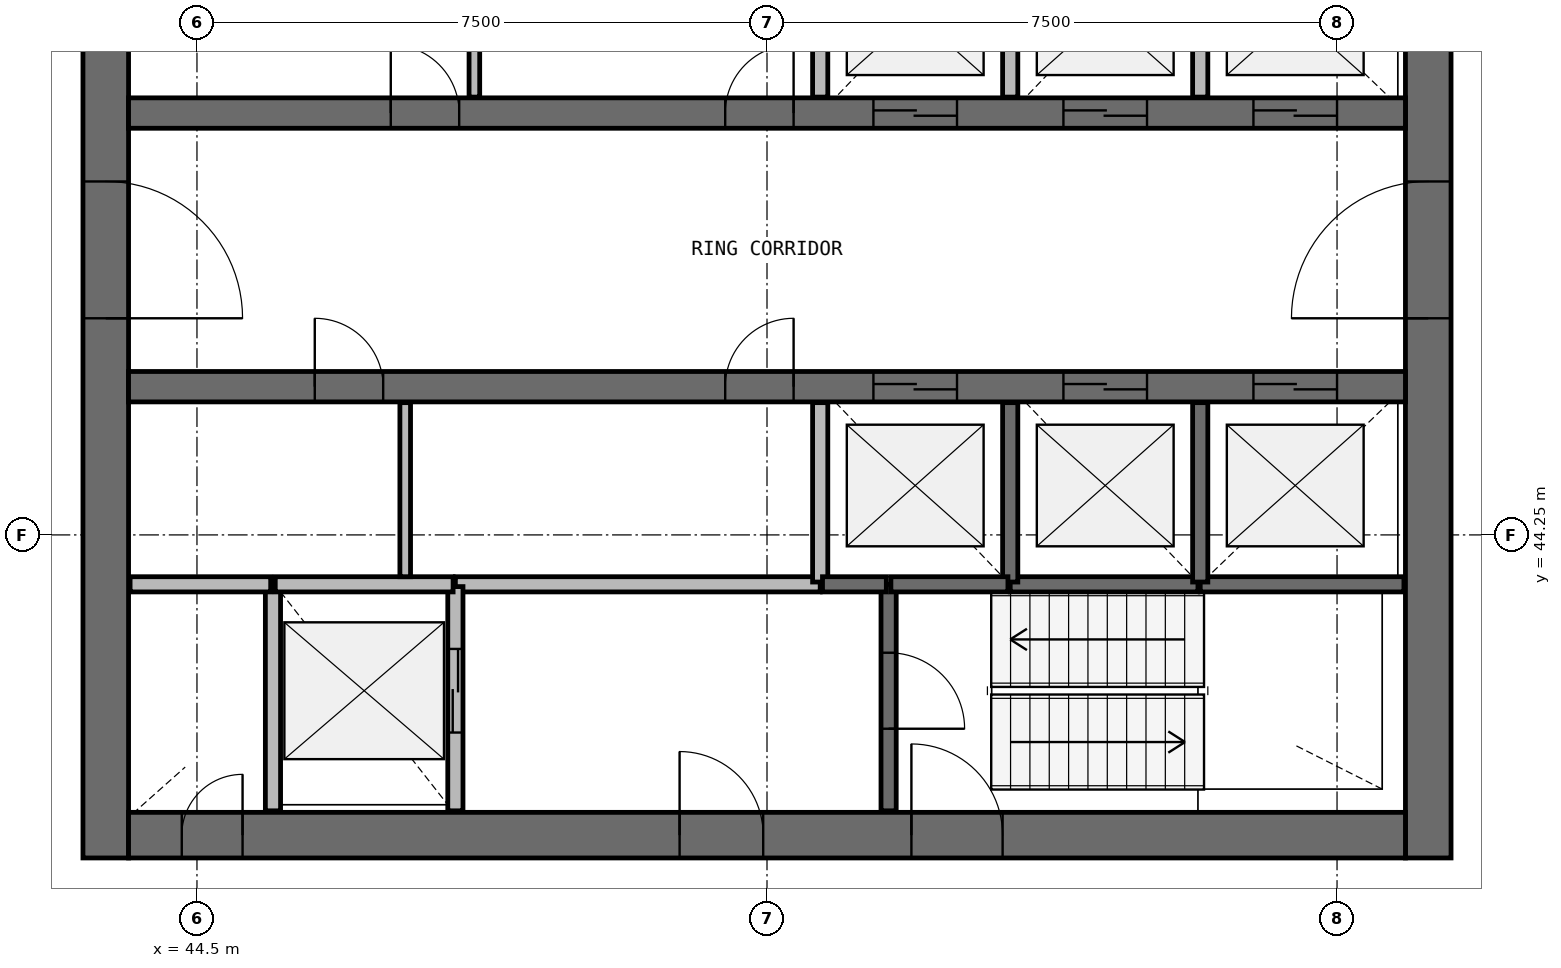
"""IFC4 building model, lengths in metres.
Left out: names, types, materials, properties, quantities, classifications, styles, units other than length and angle.
Written with IfcOpenShell. Run it as: python <this file> out.ifc"""

import sys

from ifc_helpers import new_model, si_unit, direction, frame, frame_2d, origin, place, context, subcontext, project, spatial, rectangle, extrude, source, transform, mapped, element, fill, save


model = new_model("IFC4")
c1 = context("Model", 3, precision=1e-05, world=origin(), true_north=direction((0.0, 1.0)))
c2 = subcontext(c1, "Body", "Model", "MODEL_VIEW")
j1 = project(units=[si_unit("LENGTHUNIT", "METRE"), si_unit("PLANEANGLEUNIT", "RADIAN")], contexts=[c1])
p1 = place(None, origin())
s1 = spatial("IfcSite", under=j1, at=p1, CompositionType="ELEMENT")
p2 = place(p1, origin())
s2 = spatial("IfcBuilding", under=s1, at=p2, CompositionType="ELEMENT")
p3 = place(p2, frame((0.0, 0.0, 226.7)))
s3 = spatial("IfcBuildingStorey", under=s2, at=p3, CompositionType="ELEMENT", Elevation=226.7)
p4 = place(p3, frame((60.7, 40.0, 0.0), z_axis=(0.0, 0.0, 1.0), x_axis=(0.0, 1.0, 0.0)))
e1 = element("IfcWall", 1, at=p4, inside=s3, PredefinedType="SHEAR", context=c2, shape_type="SweptSolid", body=[
    extrude(rectangle(XDim=16.0, YDim=0.6, at=frame_2d((8.0, 0.0))), origin(), (0.0, 0.0, 1.0), 3.9),
])
p5 = place(p4, frame((7.1, 0.0, 0.0)))
e2 = element("IfcOpeningElement", 2, at=p5, cuts=e1, PredefinedType="OPENING", context=c2, shape_type="SweptSolid", body=[
    extrude(rectangle(XDim=1.8, YDim=2.1, at=frame_2d((0.9, 1.05))), frame((0.0, 0.31, 0.0), z_axis=(0.0, -1.0, 0.0), x_axis=(1.0, 0.0, 0.0)), (0.0, 0.0, 1.0), 0.62),
])
p6 = place(p3, frame((43.3, 56.0, 0.0), z_axis=(0.0, 0.0, 1.0), x_axis=(0.0, -1.0, 0.0)))
e3 = element("IfcWall", 3, at=p6, inside=s3, PredefinedType="SHEAR", context=c2, shape_type="SweptSolid", body=[
    extrude(rectangle(XDim=16.0, YDim=0.6, at=frame_2d((8.0, 0.0))), origin(), (0.0, 0.0, 1.0), 3.9),
])
p7 = place(p6, frame((7.1, 0.0, 0.0)))
e4 = element("IfcOpeningElement", 4, at=p7, cuts=e3, PredefinedType="OPENING", context=c2, shape_type="SweptSolid", body=[
    extrude(rectangle(XDim=1.8, YDim=2.1, at=frame_2d((0.9, 1.05))), frame((0.0, 0.31, 0.0), z_axis=(0.0, -1.0, 0.0), x_axis=(1.0, 0.0, 0.0)), (0.0, 0.0, 1.0), 0.62),
])
p8 = place(p3, frame((43.6, 40.3, 0.0), z_axis=(0.0, 0.0, 1.0), x_axis=(1.0, 0.0, 0.0)))
e5 = element("IfcWall", 5, at=p8, inside=s3, PredefinedType="SHEAR", context=c2, shape_type="SweptSolid", body=[
    extrude(rectangle(XDim=16.8, YDim=0.6, at=frame_2d((8.4, 0.0))), origin(), (0.0, 0.0, 1.0), 3.9),
])
p9 = place(p8, frame((10.3, 0.0, 0.0)))
e6 = element("IfcOpeningElement", 6, at=p9, cuts=e5, PredefinedType="OPENING", context=c2, shape_type="SweptSolid", body=[
    extrude(rectangle(XDim=1.2, YDim=2.1, at=frame_2d((0.6, 1.05))), frame((0.0, 0.31, 0.0), z_axis=(0.0, -1.0, 0.0), x_axis=(1.0, 0.0, 0.0)), (0.0, 0.0, 1.0), 0.62),
])
p10 = place(p8, frame((7.25, 0.0, 0.0)))
e7 = element("IfcOpeningElement", 7, at=p10, cuts=e5, PredefinedType="OPENING", context=c2, shape_type="SweptSolid", body=[
    extrude(rectangle(XDim=1.1, YDim=2.1, at=frame_2d((0.55, 1.05))), frame((0.0, 0.31, 0.0), z_axis=(0.0, -1.0, 0.0), x_axis=(1.0, 0.0, 0.0)), (0.0, 0.0, 1.0), 0.62),
])
p11 = place(p8, frame((0.7, 0.0, 0.0)))
e8 = element("IfcOpeningElement", 8, at=p11, cuts=e5, PredefinedType="OPENING", context=c2, shape_type="SweptSolid", body=[
    extrude(rectangle(XDim=0.8, YDim=2.1, at=frame_2d((0.4, 1.05))), frame((0.0, 0.31, 0.0), z_axis=(0.0, -1.0, 0.0), x_axis=(1.0, 0.0, 0.0)), (0.0, 0.0, 1.0), 0.62),
])
p12 = place(p3, frame((43.6, 49.8, 0.0), z_axis=(0.0, 0.0, 1.0), x_axis=(1.0, 0.0, 0.0)))
e9 = element("IfcWall", 9, at=p12, inside=s3, PredefinedType="SHEAR", context=c2, shape_type="SweptSolid", body=[
    extrude(rectangle(XDim=16.8, YDim=0.4, at=frame_2d((8.4, 0.0))), origin(), (0.0, 0.0, 1.0), 3.9),
])
p13 = place(p12, frame((9.8, 0.0, 0.0)))
e10 = element("IfcOpeningElement", 10, at=p13, cuts=e9, PredefinedType="OPENING", context=c2, shape_type="SweptSolid", body=[
    extrude(rectangle(XDim=1.1, YDim=2.1, at=frame_2d((0.55, 1.05))), frame((0.0, 0.21, 0.0), z_axis=(0.0, -1.0, 0.0), x_axis=(1.0, 0.0, 0.0)), (0.0, 0.0, 1.0), 0.42),
])
p14 = place(p12, frame((12.3, 0.0, 0.0)))
e11 = element("IfcOpeningElement", 11, at=p14, cuts=e9, PredefinedType="OPENING", context=c2, shape_type="SweptSolid", body=[
    extrude(rectangle(XDim=1.1, YDim=2.1, at=frame_2d((0.55, 1.05))), frame((0.0, 0.21, 0.0), z_axis=(0.0, -1.0, 0.0), x_axis=(1.0, 0.0, 0.0)), (0.0, 0.0, 1.0), 0.42),
])
p15 = place(p12, frame((14.8, 0.0, 0.0)))
e12 = element("IfcOpeningElement", 12, at=p15, cuts=e9, PredefinedType="OPENING", context=c2, shape_type="SweptSolid", body=[
    extrude(rectangle(XDim=1.1, YDim=2.1, at=frame_2d((0.55, 1.05))), frame((0.0, 0.21, 0.0), z_axis=(0.0, -1.0, 0.0), x_axis=(1.0, 0.0, 0.0)), (0.0, 0.0, 1.0), 0.42),
])
p16 = place(p12, frame((3.45, 0.0, 0.0)))
e13 = element("IfcOpeningElement", 13, at=p16, cuts=e9, PredefinedType="OPENING", context=c2, shape_type="SweptSolid", body=[
    extrude(rectangle(XDim=0.9, YDim=2.1, at=frame_2d((0.45, 1.05))), frame((0.0, 0.21, 0.0), z_axis=(0.0, -1.0, 0.0), x_axis=(1.0, 0.0, 0.0)), (0.0, 0.0, 1.0), 0.42),
])
p17 = place(p12, frame((7.85, 0.0, 0.0)))
e14 = element("IfcOpeningElement", 14, at=p17, cuts=e9, PredefinedType="OPENING", context=c2, shape_type="SweptSolid", body=[
    extrude(rectangle(XDim=0.9, YDim=2.1, at=frame_2d((0.45, 1.05))), frame((0.0, 0.21, 0.0), z_axis=(0.0, -1.0, 0.0), x_axis=(1.0, 0.0, 0.0)), (0.0, 0.0, 1.0), 0.42),
])
p18 = place(p3, frame((43.6, 46.2, 0.0), z_axis=(0.0, 0.0, 1.0), x_axis=(1.0, 0.0, 0.0)))
e15 = element("IfcWall", 15, at=p18, inside=s3, PredefinedType="SHEAR", context=c2, shape_type="SweptSolid", body=[
    extrude(rectangle(XDim=16.8, YDim=0.4, at=frame_2d((8.4, 0.0))), origin(), (0.0, 0.0, 1.0), 3.9),
])
p19 = place(p18, frame((9.8, 0.0, 0.0)))
e16 = element("IfcOpeningElement", 16, at=p19, cuts=e15, PredefinedType="OPENING", context=c2, shape_type="SweptSolid", body=[
    extrude(rectangle(XDim=1.1, YDim=2.1, at=frame_2d((0.55, 1.05))), frame((0.0, 0.21, 0.0), z_axis=(0.0, -1.0, 0.0), x_axis=(1.0, 0.0, 0.0)), (0.0, 0.0, 1.0), 0.42),
])
p20 = place(p18, frame((12.3, 0.0, 0.0)))
e17 = element("IfcOpeningElement", 17, at=p20, cuts=e15, PredefinedType="OPENING", context=c2, shape_type="SweptSolid", body=[
    extrude(rectangle(XDim=1.1, YDim=2.1, at=frame_2d((0.55, 1.05))), frame((0.0, 0.21, 0.0), z_axis=(0.0, -1.0, 0.0), x_axis=(1.0, 0.0, 0.0)), (0.0, 0.0, 1.0), 0.42),
])
p21 = place(p18, frame((14.8, 0.0, 0.0)))
e18 = element("IfcOpeningElement", 18, at=p21, cuts=e15, PredefinedType="OPENING", context=c2, shape_type="SweptSolid", body=[
    extrude(rectangle(XDim=1.1, YDim=2.1, at=frame_2d((0.55, 1.05))), frame((0.0, 0.21, 0.0), z_axis=(0.0, -1.0, 0.0), x_axis=(1.0, 0.0, 0.0)), (0.0, 0.0, 1.0), 0.42),
])
p22 = place(p18, frame((2.45, 0.0, 0.0)))
e19 = element("IfcOpeningElement", 19, at=p22, cuts=e15, PredefinedType="OPENING", context=c2, shape_type="SweptSolid", body=[
    extrude(rectangle(XDim=0.9, YDim=2.1, at=frame_2d((0.45, 1.05))), frame((0.0, 0.21, 0.0), z_axis=(0.0, -1.0, 0.0), x_axis=(1.0, 0.0, 0.0)), (0.0, 0.0, 1.0), 0.42),
])
p23 = place(p18, frame((7.85, 0.0, 0.0)))
e20 = element("IfcOpeningElement", 20, at=p23, cuts=e15, PredefinedType="OPENING", context=c2, shape_type="SweptSolid", body=[
    extrude(rectangle(XDim=0.9, YDim=2.1, at=frame_2d((0.45, 1.05))), frame((0.0, 0.21, 0.0), z_axis=(0.0, -1.0, 0.0), x_axis=(1.0, 0.0, 0.0)), (0.0, 0.0, 1.0), 0.42),
])
p24 = place(p3, frame((52.7, 43.6, 0.0), z_axis=(0.0, 0.0, 1.0), x_axis=(-1.0, 0.0, 0.0)))
e21 = element("IfcWall", 21, at=p24, inside=s3, PredefinedType="SOLIDWALL", context=c2, shape_type="SweptSolid", body=[
    extrude(rectangle(XDim=4.8, YDim=0.2, at=frame_2d((2.4, 0.0))), origin(), (0.0, 0.0, 1.0), 3.4),
])
p25 = place(p3, frame((45.5, 43.6, 0.0), z_axis=(0.0, 0.0, 1.0), x_axis=(0.0, -1.0, 0.0)))
e22 = element("IfcWall", 22, at=p25, inside=s3, PredefinedType="SOLIDWALL", context=c2, shape_type="SweptSolid", body=[
    extrude(rectangle(XDim=2.98, YDim=0.2, at=frame_2d((1.49, 0.0))), origin(), (0.0, 0.0, 1.0), 3.4),
])
p26 = place(p3, frame((47.9, 40.62, 0.0), z_axis=(0.0, 0.0, 1.0), x_axis=(0.0, 1.0, 0.0)))
e23 = element("IfcWall", 23, at=p26, inside=s3, PredefinedType="SOLIDWALL", context=c2, shape_type="SweptSolid", body=[
    extrude(rectangle(XDim=2.95, YDim=0.2, at=frame_2d((1.475, 0.0))), origin(), (0.0, 0.0, 1.0), 3.4),
])
p27 = place(p26, frame((1.03, 0.0, 0.0)))
e24 = element("IfcOpeningElement", 24, at=p27, cuts=e23, PredefinedType="OPENING", context=c2, shape_type="SweptSolid", body=[
    extrude(rectangle(XDim=1.1, YDim=2.1, at=frame_2d((0.55, 1.05))), frame((0.0, 0.11, 0.0), z_axis=(0.0, -1.0, 0.0), x_axis=(1.0, 0.0, 0.0)), (0.0, 0.0, 1.0), 0.22),
])
p28 = place(p3, frame((53.6, 43.6, 0.0), z_axis=(0.0, 0.0, 1.0), x_axis=(0.0, -1.0, 0.0)))
e25 = element("IfcWall", 25, at=p28, inside=s3, PredefinedType="SOLIDWALL", context=c2, shape_type="SweptSolid", body=[
    extrude(rectangle(XDim=2.98, YDim=0.2, at=frame_2d((1.49, 0.0))), origin(), (0.0, 0.0, 1.0), 3.4),
])
p29 = place(p28, frame((0.9, 0.0, 0.0)))
e26 = element("IfcOpeningElement", 26, at=p29, cuts=e25, PredefinedType="OPENING", context=c2, shape_type="SweptSolid", body=[
    extrude(rectangle(XDim=1.0, YDim=2.1, at=frame_2d((0.5, 1.05))), frame((0.0, 0.11, 0.0), z_axis=(0.0, -1.0, 0.0), x_axis=(1.0, 0.0, 0.0)), (0.0, 0.0, 1.0), 0.22),
])
p30 = place(p3, frame((57.7, 43.6, 0.0), z_axis=(0.0, 0.0, 1.0), x_axis=(1.0, 0.0, 0.0)))
e27 = element("IfcWall", 27, at=p30, inside=s3, PredefinedType="SOLIDWALL", context=c2, shape_type="SweptSolid", body=[
    extrude(rectangle(XDim=2.68, YDim=0.2, at=frame_2d((1.34, 0.0))), origin(), (0.0, 0.0, 1.0), 3.4),
])
p31 = place(p3, frame((55.2, 43.6, 0.0), z_axis=(0.0, 0.0, 1.0), x_axis=(1.0, 0.0, 0.0)))
e28 = element("IfcWall", 28, at=p31, inside=s3, PredefinedType="SOLIDWALL", context=c2, shape_type="SweptSolid", body=[
    extrude(rectangle(XDim=2.47, YDim=0.2, at=frame_2d((1.235, 0.0))), origin(), (0.0, 0.0, 1.0), 3.4),
])
p32 = place(p3, frame((47.87, 43.6, 0.0), z_axis=(0.0, 0.0, 1.0), x_axis=(-1.0, 0.0, 0.0)))
e29 = element("IfcWall", 29, at=p32, inside=s3, PredefinedType="SOLIDWALL", context=c2, shape_type="SweptSolid", body=[
    extrude(rectangle(XDim=2.34, YDim=0.2, at=frame_2d((1.17, 0.0))), origin(), (0.0, 0.0, 1.0), 3.4),
])
for number, where, z_axis, x_axis in (
    (30, (52.7, 45.99, 0.0), (0.0, 0.0, 1.0), (0.0, -1.0, 0.0)),
    (31, (52.7, 52.37, 0.0), (0.0, 0.0, 1.0), (0.0, -1.0, 0.0)),
    (32, (55.2, 43.63, 0.0), (0.0, 0.0, 1.0), (0.0, 1.0, 0.0)),
    (33, (55.2, 50.01, 0.0), (0.0, 0.0, 1.0), (0.0, 1.0, 0.0)),
    (34, (57.7, 43.63, 0.0), (0.0, 0.0, 1.0), (0.0, 1.0, 0.0)),
):
    element("IfcWall", number, at=place(p3, frame(where, z_axis=z_axis, x_axis=x_axis)), inside=s3, PredefinedType="SOLIDWALL", context=c2, shape_type="SweptSolid", body=[
        extrude(rectangle(XDim=2.36, YDim=0.2, at=frame_2d((1.18, 0.0))), origin(), (0.0, 0.0, 1.0), 3.4),
    ])
p33 = place(p3, frame((57.7, 50.01, 0.0), z_axis=(0.0, 0.0, 1.0), x_axis=(0.0, 1.0, 0.0)))
e35 = element("IfcWall", 35, at=p33, inside=s3, PredefinedType="SOLIDWALL", context=c2, shape_type="SweptSolid", body=[
    extrude(rectangle(XDim=2.39, YDim=0.2, at=frame_2d((1.195, 0.0))), origin(), (0.0, 0.0, 1.0), 3.4),
])
p34 = place(p3, frame((45.47, 43.6, 0.0), z_axis=(0.0, 0.0, 1.0), x_axis=(-1.0, 0.0, 0.0)))
e36 = element("IfcWall", 36, at=p34, inside=s3, PredefinedType="SOLIDWALL", context=c2, shape_type="SweptSolid", body=[
    extrude(rectangle(XDim=1.85, YDim=0.2, at=frame_2d((0.925, 0.0))), origin(), (0.0, 0.0, 1.0), 3.4),
])
p35 = place(p3, frame((53.63, 43.6, 0.0), z_axis=(0.0, 0.0, 1.0), x_axis=(1.0, 0.0, 0.0)))
e37 = element("IfcWall", 37, at=p35, inside=s3, PredefinedType="SOLIDWALL", context=c2, shape_type="SweptSolid", body=[
    extrude(rectangle(XDim=1.54, YDim=0.2, at=frame_2d((0.77, 0.0))), origin(), (0.0, 0.0, 1.0), 3.4),
])
p36 = place(p3, frame((52.73, 43.6, 0.0), z_axis=(0.0, 0.0, 1.0), x_axis=(1.0, 0.0, 0.0)))
e38 = element("IfcWall", 38, at=p36, inside=s3, PredefinedType="SOLIDWALL", context=c2, shape_type="SweptSolid", body=[
    extrude(rectangle(XDim=0.84, YDim=0.2, at=frame_2d((0.42, 0.0))), origin(), (0.0, 0.0, 1.0), 3.4),
])
for number, where, z_axis, x_axis in (
    (39, (47.24, 43.7, 0.0), (0.0, 0.0, 1.0), (0.0, 1.0, 0.0)),
    (40, (48.15, 50.01, 0.0), (0.0, 0.0, 1.0), (0.0, 1.0, 0.0)),
):
    element("IfcWall", number, at=place(p3, frame(where, z_axis=z_axis, x_axis=x_axis)), inside=s3, PredefinedType="PARTITIONING", context=c2, shape_type="SweptSolid", body=[
        extrude(rectangle(XDim=2.29, YDim=0.14, at=frame_2d((1.145, 0.0))), origin(), (0.0, 0.0, 1.0), 2.7),
    ])
m1 = source(origin(), c2, "Body", "SweptSolid", [
    extrude(rectangle(XDim=1.8, YDim=2.1, at=frame_2d((0.9, 1.05))), frame((0.0, 0.025, 0.0), z_axis=(0.0, -1.0, 0.0), x_axis=(1.0, 0.0, 0.0)), (0.0, 0.0, 1.0), 0.05),
])
p37 = place(p7, origin())
e41 = element("IfcDoor", 41, at=p37, inside=s3, OperationType="SINGLE_SWING_RIGHT", PredefinedType="DOOR", context=c2, shape_type="MappedRepresentation", body=[
    mapped(m1, transform((0.0, 0.0, 0.0), scale=1.0)),
])
fill(e4, e41)
p38 = place(p5, origin())
e42 = element("IfcDoor", 42, at=p38, inside=s3, OperationType="SINGLE_SWING_LEFT", PredefinedType="DOOR", context=c2, shape_type="MappedRepresentation", body=[
    mapped(m1, transform((0.0, 0.0, 0.0), scale=1.0)),
])
fill(e2, e42)
m2 = source(origin(), c2, "Body", "SweptSolid", [
    extrude(rectangle(XDim=1.1, YDim=2.1, at=frame_2d((0.55, 1.05))), frame((0.0, 0.025, 0.0), z_axis=(0.0, -1.0, 0.0), x_axis=(1.0, 0.0, 0.0)), (0.0, 0.0, 1.0), 0.05),
])
p39 = place(p13, origin())
e43 = element("IfcDoor", 43, at=p39, inside=s3, OperationType="DOUBLE_DOOR_SLIDING", PredefinedType="USERDEFINED", context=c2, shape_type="MappedRepresentation", body=[
    mapped(m2, transform((0.0, 0.0, 0.0), scale=1.0)),
])
fill(e10, e43)
p40 = place(p14, origin())
e44 = element("IfcDoor", 44, at=p40, inside=s3, OperationType="DOUBLE_DOOR_SLIDING", PredefinedType="USERDEFINED", context=c2, shape_type="MappedRepresentation", body=[
    mapped(m2, transform((0.0, 0.0, 0.0), scale=1.0)),
])
fill(e11, e44)
p41 = place(p15, origin())
e45 = element("IfcDoor", 45, at=p41, inside=s3, OperationType="DOUBLE_DOOR_SLIDING", PredefinedType="USERDEFINED", context=c2, shape_type="MappedRepresentation", body=[
    mapped(m2, transform((0.0, 0.0, 0.0), scale=1.0)),
])
fill(e12, e45)
p42 = place(p19, origin())
e46 = element("IfcDoor", 46, at=p42, inside=s3, OperationType="DOUBLE_DOOR_SLIDING", PredefinedType="USERDEFINED", context=c2, shape_type="MappedRepresentation", body=[
    mapped(m2, transform((0.0, 0.0, 0.0), scale=1.0)),
])
fill(e16, e46)
p43 = place(p20, origin())
e47 = element("IfcDoor", 47, at=p43, inside=s3, OperationType="DOUBLE_DOOR_SLIDING", PredefinedType="USERDEFINED", context=c2, shape_type="MappedRepresentation", body=[
    mapped(m2, transform((0.0, 0.0, 0.0), scale=1.0)),
])
fill(e17, e47)
p44 = place(p21, origin())
e48 = element("IfcDoor", 48, at=p44, inside=s3, OperationType="DOUBLE_DOOR_SLIDING", PredefinedType="USERDEFINED", context=c2, shape_type="MappedRepresentation", body=[
    mapped(m2, transform((0.0, 0.0, 0.0), scale=1.0)),
])
fill(e18, e48)
p45 = place(p27, origin())
e49 = element("IfcDoor", 49, at=p45, inside=s3, OperationType="DOUBLE_DOOR_SLIDING", PredefinedType="USERDEFINED", context=c2, shape_type="MappedRepresentation", body=[
    mapped(m2, transform((0.0, 0.0, 0.0), scale=1.0)),
])
fill(e24, e49)
m3 = source(origin(), c2, "Body", "SweptSolid", [
    extrude(rectangle(XDim=1.2, YDim=2.1, at=frame_2d((0.6, 1.05))), frame((0.0, 0.025, 0.0), z_axis=(0.0, -1.0, 0.0), x_axis=(1.0, 0.0, 0.0)), (0.0, 0.0, 1.0), 0.05),
])
p46 = place(p9, origin())
e50 = element("IfcDoor", 50, at=p46, inside=s3, OperationType="SINGLE_SWING_LEFT", PredefinedType="DOOR", context=c2, shape_type="MappedRepresentation", body=[
    mapped(m3, transform((0.0, 0.0, 0.0), scale=1.0)),
])
fill(e6, e50)
m4 = source(origin(), c2, "Body", "SweptSolid", [
    extrude(rectangle(XDim=1.0, YDim=2.1, at=frame_2d((0.5, 1.05))), frame((0.0, 0.025, 0.0), z_axis=(0.0, -1.0, 0.0), x_axis=(1.0, 0.0, 0.0)), (0.0, 0.0, 1.0), 0.05),
])
p47 = place(p29, origin())
e51 = element("IfcDoor", 51, at=p47, inside=s3, OperationType="SINGLE_SWING_RIGHT", PredefinedType="DOOR", context=c2, shape_type="MappedRepresentation", body=[
    mapped(m4, transform((0.0, 0.0, 0.0), scale=1.0)),
])
fill(e26, e51)
m5 = source(origin(), c2, "Body", "SweptSolid", [
    extrude(rectangle(XDim=1.1, YDim=2.1, at=frame_2d((0.55, 1.05))), frame((0.0, 0.025, 0.0), z_axis=(0.0, -1.0, 0.0), x_axis=(1.0, 0.0, 0.0)), (0.0, 0.0, 1.0), 0.05),
])
p48 = place(p10, origin())
e52 = element("IfcDoor", 52, at=p48, inside=s3, OperationType="SINGLE_SWING_LEFT", PredefinedType="DOOR", context=c2, shape_type="MappedRepresentation", body=[
    mapped(m5, transform((0.0, 0.0, 0.0), scale=1.0)),
])
fill(e7, e52)
m6 = source(origin(), c2, "Body", "SweptSolid", [
    extrude(rectangle(XDim=0.8, YDim=2.1, at=frame_2d((0.4, 1.05))), frame((0.0, 0.025, 0.0), z_axis=(0.0, -1.0, 0.0), x_axis=(1.0, 0.0, 0.0)), (0.0, 0.0, 1.0), 0.05),
])
p49 = place(p11, origin())
e53 = element("IfcDoor", 53, at=p49, inside=s3, OperationType="SINGLE_SWING_RIGHT", PredefinedType="DOOR", context=c2, shape_type="MappedRepresentation", body=[
    mapped(m6, transform((0.0, 0.0, 0.0), scale=1.0)),
])
fill(e8, e53)
m7 = source(origin(), c2, "Body", "SweptSolid", [
    extrude(rectangle(XDim=0.9, YDim=2.1, at=frame_2d((0.45, 1.05))), frame((0.0, 0.025, 0.0), z_axis=(0.0, -1.0, 0.0), x_axis=(1.0, 0.0, 0.0)), (0.0, 0.0, 1.0), 0.05),
])
p50 = place(p16, origin())
e54 = element("IfcDoor", 54, at=p50, inside=s3, OperationType="SINGLE_SWING_LEFT", PredefinedType="DOOR", context=c2, shape_type="MappedRepresentation", body=[
    mapped(m7, transform((0.0, 0.0, 0.0), scale=1.0)),
])
fill(e13, e54)
p51 = place(p17, origin())
e55 = element("IfcDoor", 55, at=p51, inside=s3, OperationType="SINGLE_SWING_RIGHT", PredefinedType="DOOR", context=c2, shape_type="MappedRepresentation", body=[
    mapped(m7, transform((0.0, 0.0, 0.0), scale=1.0)),
])
fill(e14, e55)
p52 = place(p22, origin())
e56 = element("IfcDoor", 56, at=p52, inside=s3, OperationType="SINGLE_SWING_LEFT", PredefinedType="DOOR", context=c2, shape_type="MappedRepresentation", body=[
    mapped(m7, transform((0.0, 0.0, 0.0), scale=1.0)),
])
fill(e19, e56)
p53 = place(p23, origin())
e57 = element("IfcDoor", 57, at=p53, inside=s3, OperationType="SINGLE_SWING_RIGHT", PredefinedType="DOOR", context=c2, shape_type="MappedRepresentation", body=[
    mapped(m7, transform((0.0, 0.0, 0.0), scale=1.0)),
])
fill(e20, e57)
save(model, sys.argv[1])
